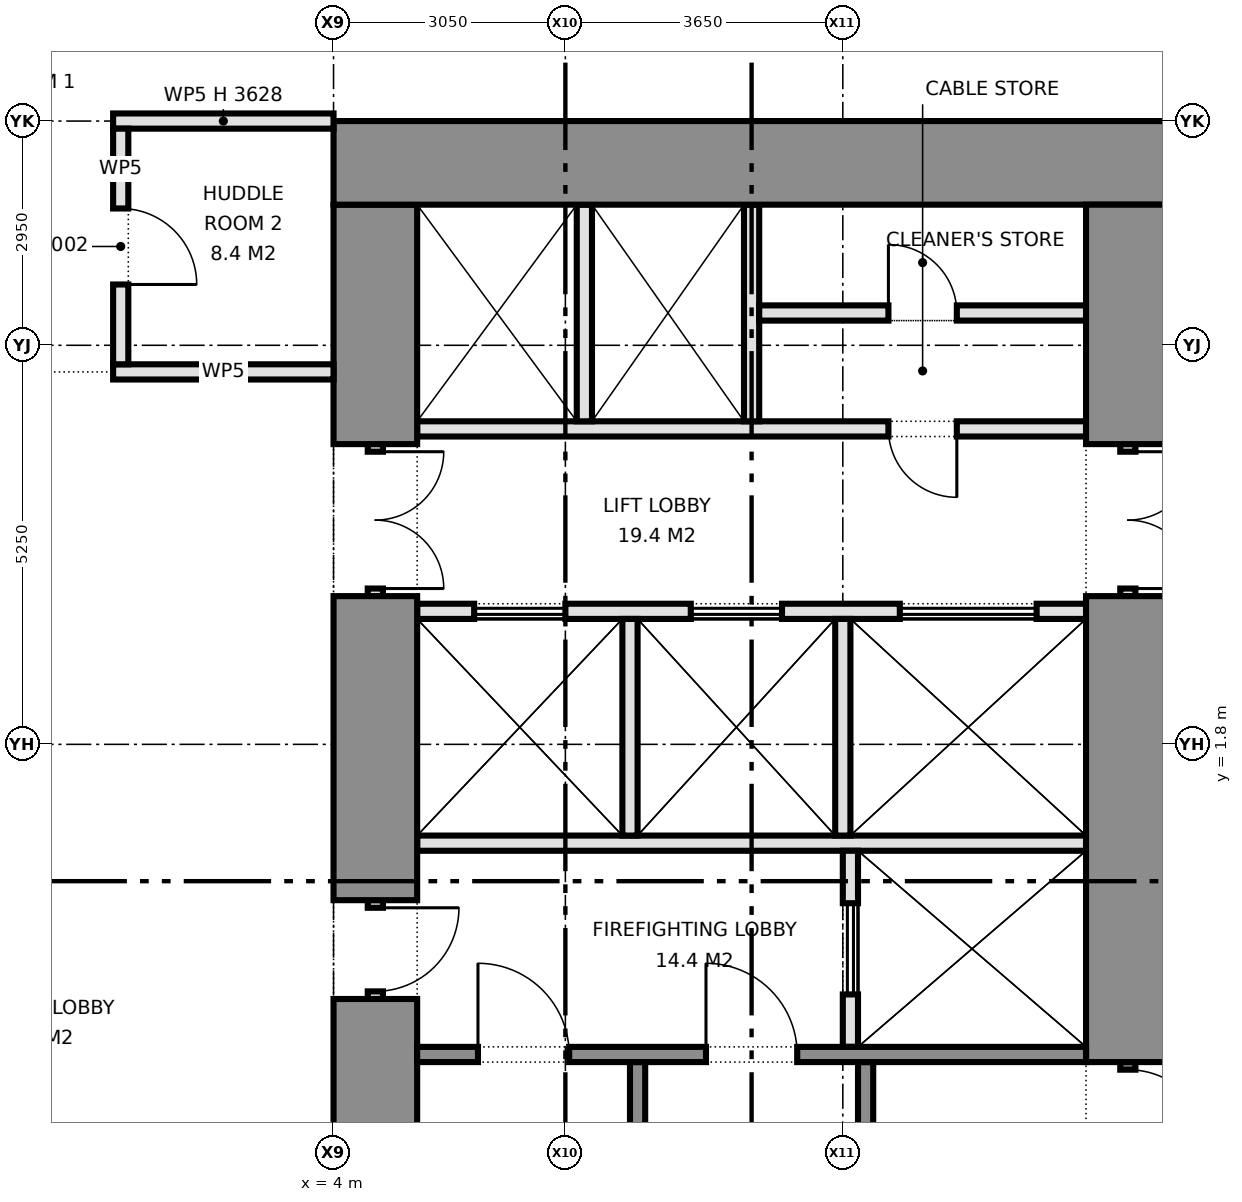
"""IFC4 building model, lengths in metres.
Left out: names, types, materials, properties, quantities, classifications, styles, units other than length and angle.
Written with IfcOpenShell. Run it as: python <this file> out.ifc"""

import sys

from ifc_helpers import new_model, si_unit, direction, frame, frame_2d, origin, place, context, subcontext, project, spatial, rectangle, extrude, element, fill, save


model = new_model("IFC4")
c1 = context("Model", 3, precision=1e-05, world=origin(), true_north=direction((0.0, 1.0)))
c2 = subcontext(c1, "Body", "Model", "MODEL_VIEW")
j1 = project(units=[si_unit("LENGTHUNIT", "METRE"), si_unit("PLANEANGLEUNIT", "RADIAN")], contexts=[c1])
p1 = place(None, origin())
s1 = spatial("IfcSite", under=j1, at=p1, CompositionType="ELEMENT")
p2 = place(p1, origin())
s2 = spatial("IfcBuilding", under=s1, at=p2, CompositionType="ELEMENT")
p3 = place(p2, frame((0.0, 0.0, 35.3)))
s3 = spatial("IfcBuildingStorey", under=s2, at=p3, CompositionType="ELEMENT", Elevation=35.3)
p4 = place(p3, frame((15.0, 9.45, 0.0), z_axis=(0.0, 0.0, 1.0), x_axis=(-1.0, 0.0, 0.0)))
e1 = element("IfcWall", 1, at=p4, inside=s3, PredefinedType="SHEAR", context=c2, shape_type="SweptSolid", body=[
    extrude(rectangle(XDim=11.0, YDim=1.1, at=frame_2d((5.5, 0.0))), origin(), (0.0, 0.0, 1.0), 4.575),
])
p5 = place(p3, frame((14.45, 8.9, 0.0), z_axis=(0.0, 0.0, 1.0), x_axis=(0.0, -1.0, 0.0)))
e2 = element("IfcWall", 2, at=p5, inside=s3, PredefinedType="SHEAR", context=c2, shape_type="SweptSolid", body=[
    extrude(rectangle(XDim=3.15, YDim=1.1, at=frame_2d((1.575, 0.0))), origin(), (0.0, 0.0, 1.0), 4.575),
])
p6 = place(p3, frame((14.45, 5.75, 0.0), z_axis=(0.0, 0.0, 1.0), x_axis=(0.0, -1.0, 0.0)))
e3 = element("IfcWall", 3, at=p6, inside=s3, PredefinedType="PARTITIONING", context=c2, shape_type="SweptSolid", body=[
    extrude(rectangle(XDim=2.0, YDim=0.2, at=frame_2d((1.0, 0.0))), origin(), (0.0, 0.0, 1.0), 2.4),
])
p7 = place(p6, frame((0.1, 0.0, 0.0)))
e4 = element("IfcOpeningElement", 4, at=p7, cuts=e3, PredefinedType="OPENING", context=c2, shape_type="SweptSolid", body=[
    extrude(rectangle(XDim=1.8, YDim=2.1, at=frame_2d((0.9, 1.05))), frame((0.0, 0.11, 0.0), z_axis=(0.0, -1.0, 0.0), x_axis=(1.0, 0.0, 0.0)), (0.0, 0.0, 1.0), 0.22),
])
p8 = place(p3, frame((14.45, 3.75, 0.0), z_axis=(0.0, 0.0, 1.0), x_axis=(0.0, -1.0, 0.0)))
e5 = element("IfcWall", 5, at=p8, inside=s3, PredefinedType="SHEAR", context=c2, shape_type="SweptSolid", body=[
    extrude(rectangle(XDim=6.13, YDim=1.1, at=frame_2d((3.065, 0.0))), origin(), (0.0, 0.0, 1.0), 4.575),
])
p9 = place(p3, frame((14.45, -2.38, 0.0), z_axis=(0.0, 0.0, 1.0), x_axis=(0.0, -1.0, 0.0)))
e6 = element("IfcWall", 6, at=p9, inside=s3, PredefinedType="SHEAR", context=c2, shape_type="SweptSolid", body=[
    extrude(rectangle(XDim=1.3, YDim=0.2, at=frame_2d((0.65, 0.0))), origin(), (0.0, 0.0, 1.0), 2.4),
])
p10 = place(p9, frame((0.1, 0.0, 0.0)))
e7 = element("IfcOpeningElement", 7, at=p10, cuts=e6, PredefinedType="OPENING", context=c2, shape_type="SweptSolid", body=[
    extrude(rectangle(XDim=1.1, YDim=2.1, at=frame_2d((0.55, 1.05))), frame((0.0, 0.11, 0.0), z_axis=(0.0, -1.0, 0.0), x_axis=(1.0, 0.0, 0.0)), (0.0, 0.0, 1.0), 0.22),
])
p11 = place(p3, frame((4.55, 8.9, 0.0), z_axis=(0.0, 0.0, 1.0), x_axis=(0.0, -1.0, 0.0)))
e8 = element("IfcWall", 8, at=p11, inside=s3, PredefinedType="SHEAR", context=c2, shape_type="SweptSolid", body=[
    extrude(rectangle(XDim=3.15, YDim=1.1, at=frame_2d((1.575, 0.0))), origin(), (0.0, 0.0, 1.0), 4.575),
])
p12 = place(p3, frame((4.55, 5.75, 0.0), z_axis=(0.0, 0.0, 1.0), x_axis=(0.0, -1.0, 0.0)))
e9 = element("IfcWall", 9, at=p12, inside=s3, PredefinedType="PARTITIONING", context=c2, shape_type="SweptSolid", body=[
    extrude(rectangle(XDim=2.0, YDim=0.2, at=frame_2d((1.0, 0.0))), origin(), (0.0, 0.0, 1.0), 2.4),
])
p13 = place(p12, frame((0.1, 0.0, 0.0)))
e10 = element("IfcOpeningElement", 10, at=p13, cuts=e9, PredefinedType="OPENING", context=c2, shape_type="SweptSolid", body=[
    extrude(rectangle(XDim=1.8, YDim=2.1, at=frame_2d((0.9, 1.05))), frame((0.0, 0.11, 0.0), z_axis=(0.0, -1.0, 0.0), x_axis=(1.0, 0.0, 0.0)), (0.0, 0.0, 1.0), 0.22),
])
p14 = place(p3, frame((4.55, 3.75, 0.0), z_axis=(0.0, 0.0, 1.0), x_axis=(0.0, -1.0, 0.0)))
e11 = element("IfcWall", 11, at=p14, inside=s3, PredefinedType="SHEAR", context=c2, shape_type="SweptSolid", body=[
    extrude(rectangle(XDim=4.0, YDim=1.1, at=frame_2d((2.0, 0.0))), origin(), (0.0, 0.0, 1.0), 4.575),
])
p15 = place(p3, frame((4.55, -0.25, 0.0), z_axis=(0.0, 0.0, 1.0), x_axis=(0.0, -1.0, 0.0)))
e12 = element("IfcWall", 12, at=p15, inside=s3, PredefinedType="PARTITIONING", context=c2, shape_type="SweptSolid", body=[
    extrude(rectangle(XDim=1.3, YDim=0.2, at=frame_2d((0.65, 0.0))), origin(), (0.0, 0.0, 1.0), 2.4),
])
p16 = place(p15, frame((0.1, 0.0, 0.0)))
e13 = element("IfcOpeningElement", 13, at=p16, cuts=e12, PredefinedType="OPENING", context=c2, shape_type="SweptSolid", body=[
    extrude(rectangle(XDim=1.1, YDim=2.1, at=frame_2d((0.55, 1.05))), frame((0.0, 0.11, 0.0), z_axis=(0.0, -1.0, 0.0), x_axis=(1.0, 0.0, 0.0)), (0.0, 0.0, 1.0), 0.22),
])
p17 = place(p3, frame((4.55, -1.55, 0.0), z_axis=(0.0, 0.0, 1.0), x_axis=(0.0, -1.0, 0.0)))
e14 = element("IfcWall", 14, at=p17, inside=s3, PredefinedType="SHEAR", context=c2, shape_type="SweptSolid", body=[
    extrude(rectangle(XDim=7.35, YDim=1.1, at=frame_2d((3.675, 0.0))), origin(), (0.0, 0.0, 1.0), 4.575),
])
p18 = place(p3, frame((13.9, 5.95, 0.0), z_axis=(0.0, 0.0, 1.0), x_axis=(-1.0, 0.0, 0.0)))
e15 = element("IfcWall", 15, at=p18, inside=s3, PredefinedType="PARTITIONING", context=c2, shape_type="SweptSolid", body=[
    extrude(rectangle(XDim=8.8, YDim=0.2, at=frame_2d((4.4, 0.0))), origin(), (0.0, 0.0, 1.0), 4.575),
])
p19 = place(p18, frame((1.7, 0.0, 0.0)))
e16 = element("IfcOpeningElement", 16, at=p19, cuts=e15, PredefinedType="OPENING", context=c2, shape_type="SweptSolid", body=[
    extrude(rectangle(XDim=0.9, YDim=2.1, at=frame_2d((0.45, 1.05))), frame((0.0, 0.11, 0.0), z_axis=(0.0, -1.0, 0.0), x_axis=(1.0, 0.0, 0.0)), (0.0, 0.0, 1.0), 0.22),
])
p20 = place(p3, frame((13.9, 3.55, 0.0), z_axis=(0.0, 0.0, 1.0), x_axis=(-1.0, 0.0, 0.0)))
e17 = element("IfcWall", 17, at=p20, inside=s3, PredefinedType="PARTITIONING", context=c2, shape_type="SweptSolid", body=[
    extrude(rectangle(XDim=8.8, YDim=0.2, at=frame_2d((4.4, 0.0))), origin(), (0.0, 0.0, 1.0), 4.575),
])
p21 = place(p20, frame((0.65, 0.0, 0.0)))
e18 = element("IfcOpeningElement", 18, at=p21, cuts=e17, PredefinedType="OPENING", context=c2, shape_type="SweptSolid", body=[
    extrude(rectangle(XDim=1.8, YDim=2.1, at=frame_2d((0.9, 1.05))), frame((0.0, 0.11, 0.0), z_axis=(0.0, -1.0, 0.0), x_axis=(1.0, 0.0, 0.0)), (0.0, 0.0, 1.0), 0.22),
])
p22 = place(p20, frame((4.0, 0.0, 0.0)))
e19 = element("IfcOpeningElement", 19, at=p22, cuts=e17, PredefinedType="OPENING", context=c2, shape_type="SweptSolid", body=[
    extrude(rectangle(XDim=1.2, YDim=2.1, at=frame_2d((0.6, 1.05))), frame((0.0, 0.11, 0.0), z_axis=(0.0, -1.0, 0.0), x_axis=(1.0, 0.0, 0.0)), (0.0, 0.0, 1.0), 0.22),
])
p23 = place(p20, frame((6.85, 0.0, 0.0)))
e20 = element("IfcOpeningElement", 20, at=p23, cuts=e17, PredefinedType="OPENING", context=c2, shape_type="SweptSolid", body=[
    extrude(rectangle(XDim=1.2, YDim=2.1, at=frame_2d((0.6, 1.05))), frame((0.0, 0.11, 0.0), z_axis=(0.0, -1.0, 0.0), x_axis=(1.0, 0.0, 0.0)), (0.0, 0.0, 1.0), 0.22),
])
p24 = place(p3, frame((13.9, 0.5, 0.0), z_axis=(0.0, 0.0, 1.0), x_axis=(-1.0, 0.0, 0.0)))
e21 = element("IfcWall", 21, at=p24, inside=s3, PredefinedType="PARTITIONING", context=c2, shape_type="SweptSolid", body=[
    extrude(rectangle(XDim=8.8, YDim=0.2, at=frame_2d((4.4, 0.0))), origin(), (0.0, 0.0, 1.0), 4.575),
])
p25 = place(p3, frame((10.8, 0.4, 0.0), z_axis=(0.0, 0.0, 1.0), x_axis=(0.0, -1.0, 0.0)))
e22 = element("IfcWall", 22, at=p25, inside=s3, PredefinedType="PARTITIONING", context=c2, shape_type="SweptSolid", body=[
    extrude(rectangle(XDim=2.58, YDim=0.2, at=frame_2d((1.29, 0.0))), origin(), (0.0, 0.0, 1.0), 4.575),
])
p26 = place(p25, frame((0.69, 0.0, 0.0)))
e23 = element("IfcOpeningElement", 23, at=p26, cuts=e22, PredefinedType="OPENING", context=c2, shape_type="SweptSolid", body=[
    extrude(rectangle(XDim=1.2, YDim=2.1, at=frame_2d((0.6, 1.05))), frame((0.0, 0.11, 0.0), z_axis=(0.0, -1.0, 0.0), x_axis=(1.0, 0.0, 0.0)), (0.0, 0.0, 1.0), 0.22),
])
p27 = place(p3, frame((13.9, -2.28, 0.0), z_axis=(0.0, 0.0, 1.0), x_axis=(-1.0, 0.0, 0.0)))
e24 = element("IfcWall", 24, at=p27, inside=s3, PredefinedType="SHEAR", context=c2, shape_type="SweptSolid", body=[
    extrude(rectangle(XDim=8.8, YDim=0.2, at=frame_2d((4.4, 0.0))), origin(), (0.0, 0.0, 1.0), 4.575),
])
p28 = place(p27, frame((3.8, 0.0, 0.0)))
e25 = element("IfcOpeningElement", 25, at=p28, cuts=e24, PredefinedType="OPENING", context=c2, shape_type="SweptSolid", body=[
    extrude(rectangle(XDim=1.2, YDim=2.1, at=frame_2d((0.6, 1.05))), frame((0.0, 0.11, 0.0), z_axis=(0.0, -1.0, 0.0), x_axis=(1.0, 0.0, 0.0)), (0.0, 0.0, 1.0), 0.22),
])
p29 = place(p27, frame((6.8, 0.0, 0.0)))
e26 = element("IfcOpeningElement", 26, at=p29, cuts=e24, PredefinedType="OPENING", context=c2, shape_type="SweptSolid", body=[
    extrude(rectangle(XDim=1.2, YDim=2.1, at=frame_2d((0.6, 1.05))), frame((0.0, 0.11, 0.0), z_axis=(0.0, -1.0, 0.0), x_axis=(1.0, 0.0, 0.0)), (0.0, 0.0, 1.0), 0.22),
])
for number, where, z_axis, x_axis in (
    (27, (11.0, -2.38, 0.0), (0.0, 0.0, 1.0), (0.0, -1.0, 0.0)),
    (28, (8.0, -2.38, 0.0), (0.0, 0.0, 1.0), (0.0, -1.0, 0.0)),
):
    element("IfcWall", number, at=place(p3, frame(where, z_axis=z_axis, x_axis=x_axis)), inside=s3, PredefinedType="SHEAR", context=c2, shape_type="SweptSolid", body=[
        extrude(rectangle(XDim=6.52, YDim=0.2, at=frame_2d((3.26, 0.0))), origin(), (0.0, 0.0, 1.0), 4.575),
    ])
for number, where, z_axis, x_axis in (
    (29, (9.5, 8.9, 0.0), (0.0, 0.0, 1.0), (0.0, -1.0, 0.0)),
    (30, (7.3, 8.9, 0.0), (0.0, 0.0, 1.0), (0.0, -1.0, 0.0)),
):
    element("IfcWall", number, at=place(p3, frame(where, z_axis=z_axis, x_axis=x_axis)), inside=s3, PredefinedType="PARTITIONING", context=c2, shape_type="SweptSolid", body=[
        extrude(rectangle(XDim=2.85, YDim=0.2, at=frame_2d((1.425, 0.0))), origin(), (0.0, 0.0, 1.0), 4.575),
    ])
p30 = place(p3, frame((13.9, 7.475, 0.0), z_axis=(0.0, 0.0, 1.0), x_axis=(-1.0, 0.0, 0.0)))
e31 = element("IfcWall", 31, at=p30, inside=s3, PredefinedType="PARTITIONING", context=c2, shape_type="SweptSolid", body=[
    extrude(rectangle(XDim=4.3, YDim=0.2, at=frame_2d((2.15, 0.0))), origin(), (0.0, 0.0, 1.0), 4.575),
])
p31 = place(p30, frame((1.7, 0.0, 0.0)))
e32 = element("IfcOpeningElement", 32, at=p31, cuts=e31, PredefinedType="OPENING", context=c2, shape_type="SweptSolid", body=[
    extrude(rectangle(XDim=0.9, YDim=2.1, at=frame_2d((0.45, 1.05))), frame((0.0, 0.11, 0.0), z_axis=(0.0, -1.0, 0.0), x_axis=(1.0, 0.0, 0.0)), (0.0, 0.0, 1.0), 0.22),
])
for number, where, z_axis, x_axis in (
    (33, (10.7, 3.45, 0.0), (0.0, 0.0, 1.0), (0.0, -1.0, 0.0)),
    (34, (7.9, 3.45, 0.0), (0.0, 0.0, 1.0), (0.0, -1.0, 0.0)),
):
    element("IfcWall", number, at=place(p3, frame(where, z_axis=z_axis, x_axis=x_axis)), inside=s3, PredefinedType="PARTITIONING", context=c2, shape_type="SweptSolid", body=[
        extrude(rectangle(XDim=2.85, YDim=0.2, at=frame_2d((1.425, 0.0))), origin(), (0.0, 0.0, 1.0), 4.575),
    ])
p32 = place(p3, frame((1.1, 6.7, 0.0), z_axis=(0.0, 0.0, 1.0), x_axis=(1.0, 0.0, 0.0)))
e35 = element("IfcWall", 35, at=p32, inside=s3, PredefinedType="PARTITIONING", context=c2, shape_type="SweptSolid", body=[
    extrude(rectangle(XDim=2.9, YDim=0.2, at=frame_2d((1.45, 0.0))), origin(), (0.0, 0.0, 1.0), 4.575),
])
p33 = place(p3, frame((1.1, 10.0, 0.0), z_axis=(0.0, 0.0, 1.0), x_axis=(1.0, 0.0, 0.0)))
e36 = element("IfcWall", 36, at=p33, inside=s3, PredefinedType="PARTITIONING", context=c2, shape_type="SweptSolid", body=[
    extrude(rectangle(XDim=2.9, YDim=0.2, at=frame_2d((1.45, 0.0))), origin(), (0.0, 0.0, 1.0), 3.627),
])
p34 = place(p3, frame((1.2, 6.8, 0.0), z_axis=(0.0, 0.0, 1.0), x_axis=(0.0, 1.0, 0.0)))
e37 = element("IfcWall", 37, at=p34, inside=s3, PredefinedType="PARTITIONING", context=c2, shape_type="SweptSolid", body=[
    extrude(rectangle(XDim=3.1, YDim=0.2, at=frame_2d((1.55, 0.0))), origin(), (0.0, 0.0, 1.0), 4.575),
])
p35 = place(p34, frame((1.05, 0.0, 0.0)))
e38 = element("IfcOpeningElement", 38, at=p35, cuts=e37, PredefinedType="OPENING", context=c2, shape_type="SweptSolid", body=[
    extrude(rectangle(XDim=1.0, YDim=2.1, at=frame_2d((0.5, 1.05))), frame((0.0, 0.11, 0.0), z_axis=(0.0, -1.0, 0.0), x_axis=(1.0, 0.0, 0.0)), (0.0, 0.0, 1.0), 0.22),
])
p36 = place(p7, origin())
e39 = element("IfcDoor", 39, at=p36, inside=s3, OperationType="DOUBLE_DOOR_SINGLE_SWING", PredefinedType="DOOR", context=c2, shape_type="SweptSolid", body=[
    extrude(rectangle(XDim=1.8, YDim=2.1, at=frame_2d((0.9, 1.05))), frame((0.0, 0.025, 0.0), z_axis=(0.0, -1.0, 0.0), x_axis=(1.0, 0.0, 0.0)), (0.0, 0.0, 1.0), 0.05),
])
fill(e4, e39)
p37 = place(p10, origin())
e40 = element("IfcDoor", 40, at=p37, inside=s3, OperationType="SINGLE_SWING_RIGHT", PredefinedType="DOOR", context=c2, shape_type="SweptSolid", body=[
    extrude(rectangle(XDim=1.1, YDim=2.1, at=frame_2d((0.55, 1.05))), frame((0.0, 0.025, 0.0), z_axis=(0.0, -1.0, 0.0), x_axis=(1.0, 0.0, 0.0)), (0.0, 0.0, 1.0), 0.05),
])
fill(e7, e40)
p38 = place(p13, origin())
e41 = element("IfcDoor", 41, at=p38, inside=s3, OperationType="DOUBLE_DOOR_SINGLE_SWING", PredefinedType="DOOR", context=c2, shape_type="SweptSolid", body=[
    extrude(rectangle(XDim=1.8, YDim=2.1, at=frame_2d((0.9, 1.05))), frame((0.0, 0.025, 0.0), z_axis=(0.0, -1.0, 0.0), x_axis=(1.0, 0.0, 0.0)), (0.0, 0.0, 1.0), 0.05),
])
fill(e10, e41)
p39 = place(p16, origin())
e42 = element("IfcDoor", 42, at=p39, inside=s3, OperationType="SINGLE_SWING_LEFT", PredefinedType="DOOR", context=c2, shape_type="SweptSolid", body=[
    extrude(rectangle(XDim=1.1, YDim=2.1, at=frame_2d((0.55, 1.05))), frame((0.0, 0.025, 0.0), z_axis=(0.0, -1.0, 0.0), x_axis=(1.0, 0.0, 0.0)), (0.0, 0.0, 1.0), 0.05),
])
fill(e13, e42)
p40 = place(p21, origin())
e43 = element("IfcDoor", 43, at=p40, inside=s3, OperationType="DOUBLE_DOOR_SLIDING", PredefinedType="DOOR", context=c2, shape_type="SweptSolid", body=[
    extrude(rectangle(XDim=1.8, YDim=2.1, at=frame_2d((0.9, 1.05))), frame((0.0, 0.025, 0.0), z_axis=(0.0, -1.0, 0.0), x_axis=(1.0, 0.0, 0.0)), (0.0, 0.0, 1.0), 0.05),
])
fill(e18, e43)
p41 = place(p22, origin())
e44 = element("IfcDoor", 44, at=p41, inside=s3, OperationType="DOUBLE_DOOR_SLIDING", PredefinedType="DOOR", context=c2, shape_type="SweptSolid", body=[
    extrude(rectangle(XDim=1.2, YDim=2.1, at=frame_2d((0.6, 1.05))), frame((0.0, 0.025, 0.0), z_axis=(0.0, -1.0, 0.0), x_axis=(1.0, 0.0, 0.0)), (0.0, 0.0, 1.0), 0.05),
])
fill(e19, e44)
p42 = place(p23, origin())
e45 = element("IfcDoor", 45, at=p42, inside=s3, OperationType="DOUBLE_DOOR_SLIDING", PredefinedType="DOOR", context=c2, shape_type="SweptSolid", body=[
    extrude(rectangle(XDim=1.2, YDim=2.1, at=frame_2d((0.6, 1.05))), frame((0.0, 0.025, 0.0), z_axis=(0.0, -1.0, 0.0), x_axis=(1.0, 0.0, 0.0)), (0.0, 0.0, 1.0), 0.05),
])
fill(e20, e45)
p43 = place(p26, origin())
e46 = element("IfcDoor", 46, at=p43, inside=s3, OperationType="DOUBLE_DOOR_SLIDING", PredefinedType="DOOR", context=c2, shape_type="SweptSolid", body=[
    extrude(rectangle(XDim=1.2, YDim=2.1, at=frame_2d((0.6, 1.05))), frame((0.0, 0.025, 0.0), z_axis=(0.0, -1.0, 0.0), x_axis=(1.0, 0.0, 0.0)), (0.0, 0.0, 1.0), 0.05),
])
fill(e23, e46)
p44 = place(p19, origin())
e47 = element("IfcDoor", 47, at=p44, inside=s3, OperationType="SINGLE_SWING_LEFT", PredefinedType="DOOR", context=c2, shape_type="SweptSolid", body=[
    extrude(rectangle(XDim=0.9, YDim=2.1, at=frame_2d((0.45, 1.05))), frame((0.0, 0.025, 0.0), z_axis=(0.0, -1.0, 0.0), x_axis=(1.0, 0.0, 0.0)), (0.0, 0.0, 1.0), 0.05),
])
fill(e16, e47)
p45 = place(p31, frame((0.9, 0.0, 0.0), z_axis=(0.0, 0.0, 1.0), x_axis=(-1.0, 0.0, 0.0)))
e48 = element("IfcDoor", 48, at=p45, inside=s3, OperationType="SINGLE_SWING_LEFT", PredefinedType="DOOR", context=c2, shape_type="SweptSolid", body=[
    extrude(rectangle(XDim=0.9, YDim=2.1, at=frame_2d((0.45, 1.05))), frame((0.0, 0.025, 0.0), z_axis=(0.0, -1.0, 0.0), x_axis=(1.0, 0.0, 0.0)), (0.0, 0.0, 1.0), 0.05),
])
fill(e32, e48)
p46 = place(p28, frame((1.2, 0.0, 0.0), z_axis=(0.0, 0.0, 1.0), x_axis=(-1.0, 0.0, 0.0)))
e49 = element("IfcDoor", 49, at=p46, inside=s3, OperationType="SINGLE_SWING_LEFT", PredefinedType="DOOR", context=c2, shape_type="SweptSolid", body=[
    extrude(rectangle(XDim=1.2, YDim=2.1, at=frame_2d((0.6, 1.05))), frame((0.0, 0.025, 0.0), z_axis=(0.0, -1.0, 0.0), x_axis=(1.0, 0.0, 0.0)), (0.0, 0.0, 1.0), 0.05),
])
fill(e25, e49)
p47 = place(p29, frame((1.2, 0.0, 0.0), z_axis=(0.0, 0.0, 1.0), x_axis=(-1.0, 0.0, 0.0)))
e50 = element("IfcDoor", 50, at=p47, inside=s3, OperationType="SINGLE_SWING_LEFT", PredefinedType="DOOR", context=c2, shape_type="SweptSolid", body=[
    extrude(rectangle(XDim=1.2, YDim=2.1, at=frame_2d((0.6, 1.05))), frame((0.0, 0.025, 0.0), z_axis=(0.0, -1.0, 0.0), x_axis=(1.0, 0.0, 0.0)), (0.0, 0.0, 1.0), 0.05),
])
fill(e26, e50)
p48 = place(p35, frame((1.0, 0.0, 0.0), z_axis=(0.0, 0.0, 1.0), x_axis=(-1.0, 0.0, 0.0)))
e51 = element("IfcDoor", 51, at=p48, inside=s3, OperationType="SINGLE_SWING_RIGHT", PredefinedType="DOOR", context=c2, shape_type="SweptSolid", body=[
    extrude(rectangle(XDim=1.0, YDim=2.1, at=frame_2d((0.5, 1.05))), frame((0.0, 0.025, 0.0), z_axis=(0.0, -1.0, 0.0), x_axis=(1.0, 0.0, 0.0)), (0.0, 0.0, 1.0), 0.05),
])
fill(e38, e51)
save(model, sys.argv[1])
